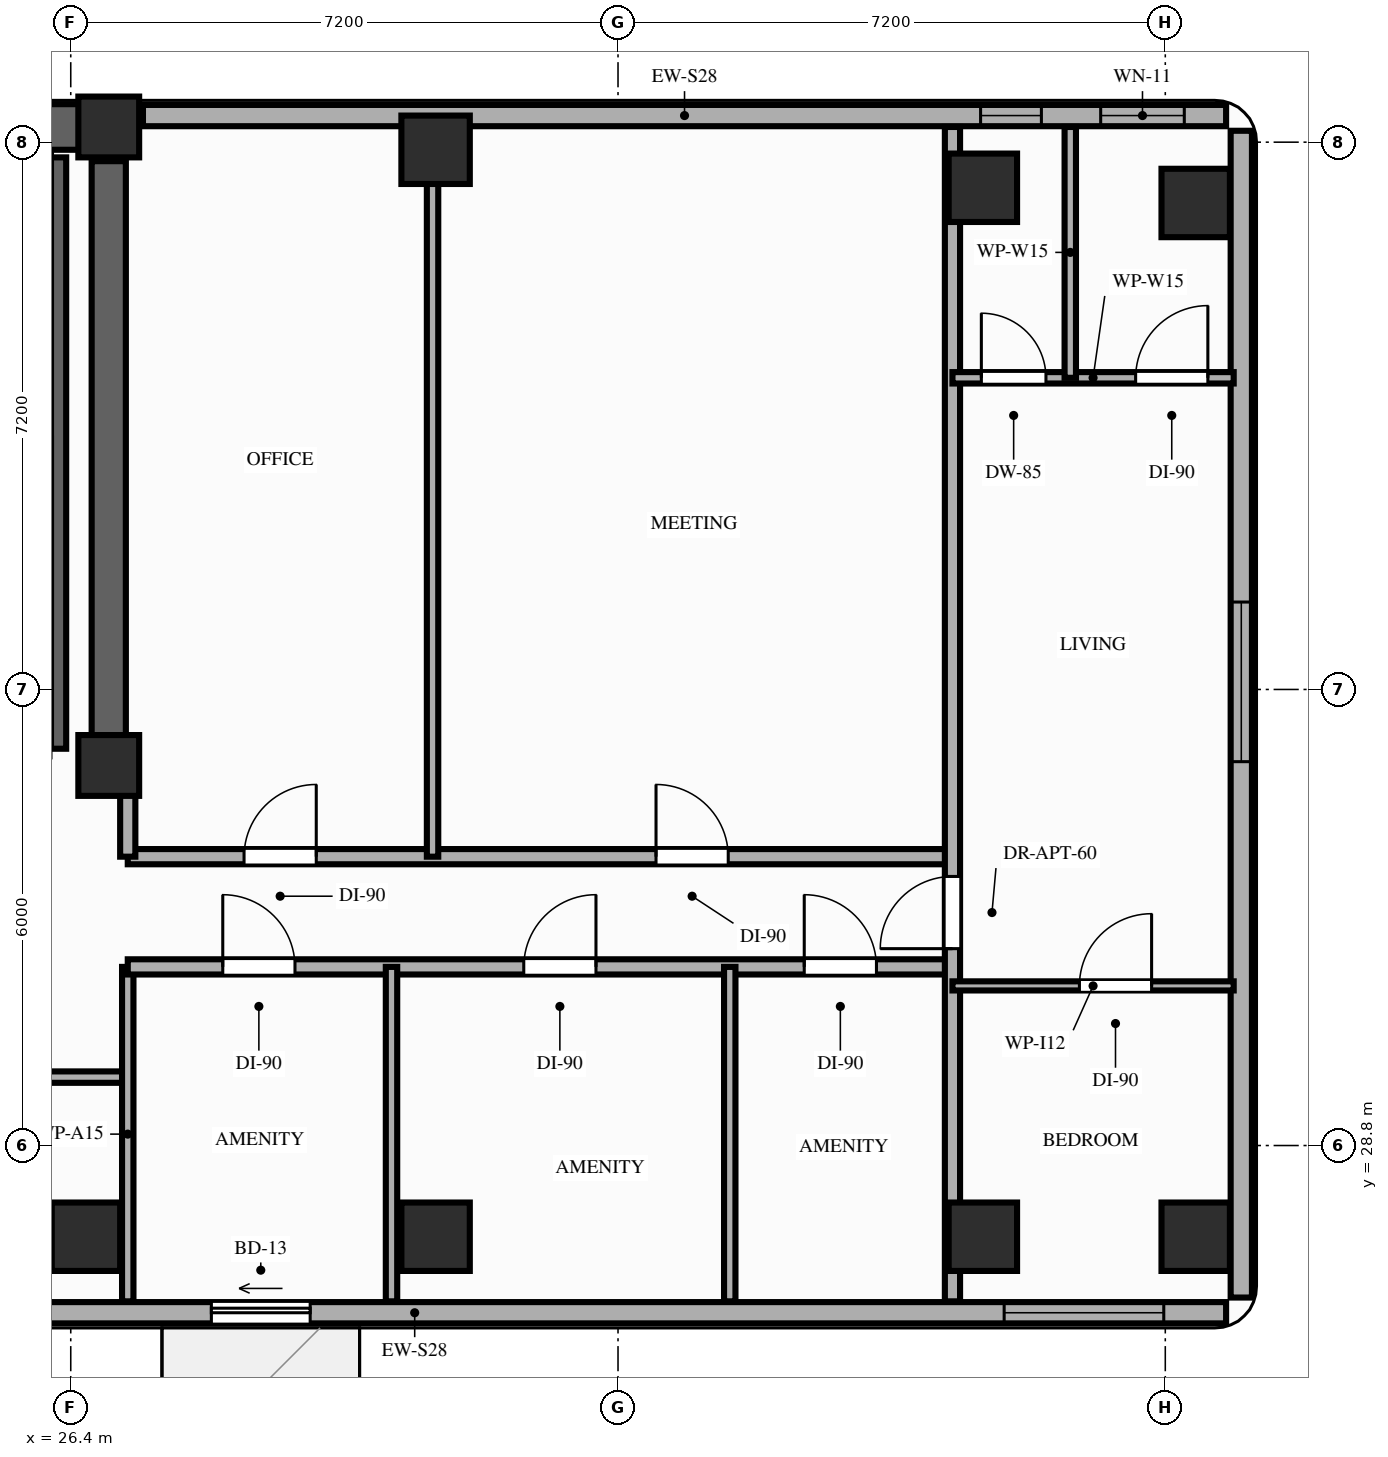
"""IFC4 building model, lengths in metres.
Left out: names, types, materials, properties, quantities, classifications, styles, units other than length and angle.
Written with IfcOpenShell. Run it as: python <this file> out.ifc"""

import sys

from ifc_helpers import new_model, si_unit, direction, frame, frame_2d, origin, origin_2d, place, context, subcontext, project, spatial, rectangle, extrude, element, fill, save


model = new_model("IFC4")
c1 = context("Model", 3, precision=1e-05, world=origin(), true_north=direction((0.0, 1.0)))
c2 = subcontext(c1, "Body", "Model", "MODEL_VIEW")
j1 = project(units=[si_unit("LENGTHUNIT", "METRE"), si_unit("PLANEANGLEUNIT", "RADIAN")], contexts=[c1])
p1 = place(None, origin())
s1 = spatial("IfcSite", under=j1, at=p1, CompositionType="ELEMENT")
p2 = place(p1, origin())
s2 = spatial("IfcBuilding", under=s1, at=p2, CompositionType="ELEMENT")
p3 = place(p2, frame((0.0, 0.0, 201.6)))
s3 = spatial("IfcBuildingStorey", under=s2, at=p3, CompositionType="ELEMENT", Elevation=201.6)
for number, where, z_axis, x_axis in (
    (1, (26.9, 33.8, 0.0), (0.0, 0.0, 1.0), (1.0, 0.0, 0.0)),
    (2, (26.9, 42.2, 0.0), (0.0, 0.0, 1.0), (1.0, 0.0, 0.0)),
):
    element("IfcColumn", number, at=place(p3, frame(where, z_axis=z_axis, x_axis=x_axis)), inside=s3, PredefinedType="COLUMN", context=c2, shape_type="SweptSolid", body=[
        extrude(rectangle(XDim=0.8, YDim=0.8, at=origin_2d()), origin(), (0.0, 0.0, 1.0), 3.2),
    ])
for number, where, z_axis, x_axis in (
    (3, (26.6, 27.6, 0.0), (0.0, 0.0, 1.0), (1.0, 0.0, 0.0)),
    (4, (31.2, 27.6, 0.0), (0.0, 0.0, 1.0), (1.0, 0.0, 0.0)),
    (5, (31.2, 41.9, 0.0), (0.0, 0.0, 1.0), (1.0, 0.0, 0.0)),
    (6, (38.4, 27.6, 0.0), (0.0, 0.0, 1.0), (1.0, 0.0, 0.0)),
    (7, (38.4, 41.4, 0.0), (0.0, 0.0, 1.0), (1.0, 0.0, 0.0)),
    (8, (41.2, 27.6, 0.0), (0.0, 0.0, 1.0), (1.0, 0.0, 0.0)),
    (9, (41.2, 41.2, 0.0), (0.0, 0.0, 1.0), (1.0, 0.0, 0.0)),
):
    element("IfcColumn", number, at=place(p3, frame(where, z_axis=z_axis, x_axis=x_axis)), inside=s3, PredefinedType="COLUMN", context=c2, shape_type="SweptSolid", body=[
        extrude(rectangle(XDim=0.9, YDim=0.9, at=origin_2d()), origin(), (0.0, 0.0, 1.0), 3.2),
    ])
p4 = place(p3, frame((41.6, 42.35, 0.0), z_axis=(0.0, 0.0, 1.0), x_axis=(-1.0, 0.0, 0.0)))
e10 = element("IfcWall", 10, at=p4, inside=s3, PredefinedType="STANDARD", context=c2, shape_type="SweptSolid", body=[
    extrude(rectangle(XDim=14.25, YDim=0.28, at=frame_2d((7.125, 0.0))), origin(), (0.0, 0.0, 1.0), 2.47),
])
p5 = place(p4, frame((2.43, 0.0, 0.85)))
e11 = element("IfcOpeningElement", 11, at=p5, cuts=e10, PredefinedType="OPENING", context=c2, shape_type="SweptSolid", body=[
    extrude(rectangle(XDim=0.8, YDim=1.37, at=frame_2d((0.4, 0.685))), frame((0.0, 0.15, 0.0), z_axis=(0.0, -1.0, 0.0), x_axis=(1.0, 0.0, 0.0)), (0.0, 0.0, 1.0), 0.3),
])
p6 = place(p4, frame((0.55, 0.0, 0.85)))
e12 = element("IfcOpeningElement", 12, at=p6, cuts=e10, PredefinedType="OPENING", context=c2, shape_type="SweptSolid", body=[
    extrude(rectangle(XDim=1.1, YDim=1.37, at=frame_2d((0.55, 0.685))), frame((0.0, 0.15, 0.0), z_axis=(0.0, -1.0, 0.0), x_axis=(1.0, 0.0, 0.0)), (0.0, 0.0, 1.0), 0.3),
])
p7 = place(p3, frame((20.25, 26.6, 0.0), z_axis=(0.0, 0.0, 1.0), x_axis=(1.0, 0.0, 0.0)))
e13 = element("IfcWall", 13, at=p7, inside=s3, PredefinedType="STANDARD", context=c2, shape_type="SweptSolid", body=[
    extrude(rectangle(XDim=21.35, YDim=0.28, at=frame_2d((10.675, 0.0))), origin(), (0.0, 0.0, 1.0), 3.02),
])
p8 = place(p7, frame((8.0, 0.0, 0.0)))
e14 = element("IfcOpeningElement", 14, at=p8, cuts=e13, PredefinedType="OPENING", context=c2, shape_type="SweptSolid", body=[
    extrude(rectangle(XDim=1.3, YDim=2.08, at=frame_2d((0.65, 1.04))), frame((0.0, 0.15, 0.0), z_axis=(0.0, -1.0, 0.0), x_axis=(1.0, 0.0, 0.0)), (0.0, 0.0, 1.0), 0.3),
])
p9 = place(p7, frame((18.43, 0.0, 0.85)))
e15 = element("IfcOpeningElement", 15, at=p9, cuts=e13, PredefinedType="OPENING", context=c2, shape_type="SweptSolid", body=[
    extrude(rectangle(XDim=2.1, YDim=1.8, at=frame_2d((1.05, 0.9))), frame((0.0, 0.15, 0.0), z_axis=(0.0, -1.0, 0.0), x_axis=(1.0, 0.0, 0.0)), (0.0, 0.0, 1.0), 0.3),
])
p10 = place(p7, frame((2.1, 0.0, 0.85)))
e16 = element("IfcOpeningElement", 16, at=p10, cuts=e13, PredefinedType="OPENING", context=c2, shape_type="SweptSolid", body=[
    extrude(rectangle(XDim=2.1, YDim=1.8, at=frame_2d((1.05, 0.9))), frame((0.0, 0.15, 0.0), z_axis=(0.0, -1.0, 0.0), x_axis=(1.0, 0.0, 0.0)), (0.0, 0.0, 1.0), 0.3),
])
p11 = place(p3, frame((41.8, 26.8, 0.0), z_axis=(0.0, 0.0, 1.0), x_axis=(0.0, 1.0, 0.0)))
e17 = element("IfcWall", 17, at=p11, inside=s3, PredefinedType="STANDARD", context=c2, shape_type="SweptSolid", body=[
    extrude(rectangle(XDim=15.35, YDim=0.28, at=frame_2d((7.675, 0.0))), origin(), (0.0, 0.0, 1.0), 3.02),
])
p12 = place(p11, frame((7.05, 0.0, 0.85)))
e18 = element("IfcOpeningElement", 18, at=p12, cuts=e17, PredefinedType="OPENING", context=c2, shape_type="SweptSolid", body=[
    extrude(rectangle(XDim=2.1, YDim=1.8, at=frame_2d((1.05, 0.9))), frame((0.0, 0.15, 0.0), z_axis=(0.0, -1.0, 0.0), x_axis=(1.0, 0.0, 0.0)), (0.0, 0.0, 1.0), 0.3),
])
p13 = place(p3, frame((6.45, 42.2, 0.0), z_axis=(0.0, 0.0, 1.0), x_axis=(1.0, 0.0, 0.0)))
e19 = element("IfcWall", 19, at=p13, inside=s3, PredefinedType="SHEAR", context=c2, shape_type="SweptSolid", body=[
    extrude(rectangle(XDim=20.45, YDim=0.6, at=frame_2d((10.225, 0.0))), origin(), (0.0, 0.0, 1.0), 3.02),
])
p14 = place(p3, frame((26.9, 33.8, 0.0), z_axis=(0.0, 0.0, 1.0), x_axis=(0.0, 1.0, 0.0)))
e20 = element("IfcWall", 20, at=p14, inside=s3, PredefinedType="SHEAR", context=c2, shape_type="SweptSolid", body=[
    extrude(rectangle(XDim=7.95, YDim=0.45, at=frame_2d((3.975, 0.0))), origin(), (0.0, 0.0, 1.0), 3.02),
])
p15 = place(p3, frame((26.24, 34.02, 0.0), z_axis=(0.0, 0.0, 1.0), x_axis=(0.0, 1.0, 0.0)))
e21 = element("IfcWall", 21, at=p15, inside=s3, PredefinedType="SHEAR", context=c2, shape_type="SweptSolid", body=[
    extrude(rectangle(XDim=7.78, YDim=0.2, at=frame_2d((3.89, 0.0))), origin(), (0.0, 0.0, 1.0), 3.02),
])
p16 = place(p3, frame((20.45, 29.7, 0.0), z_axis=(0.0, 0.0, 1.0), x_axis=(1.0, 0.0, 0.0)))
e22 = element("IfcWall", 22, at=p16, inside=s3, PredefinedType="PARTITIONING", context=c2, shape_type="SweptSolid", body=[
    extrude(rectangle(XDim=6.7, YDim=0.15, at=frame_2d((3.35, 0.0))), origin(), (0.0, 0.0, 1.0), 3.02),
])
p17 = place(p16, frame((2.8, 0.0, 0.0)))
e23 = element("IfcOpeningElement", 23, at=p17, cuts=e22, PredefinedType="OPENING", context=c2, shape_type="SweptSolid", body=[
    extrude(rectangle(XDim=0.95, YDim=2.15, at=frame_2d((0.475, 1.075))), frame((0.0, 0.085, 0.0), z_axis=(0.0, -1.0, 0.0), x_axis=(1.0, 0.0, 0.0)), (0.0, 0.0, 1.0), 0.17),
])
p18 = place(p3, frame((27.15, 26.75, 0.0), z_axis=(0.0, 0.0, 1.0), x_axis=(0.0, 1.0, 0.0)))
e24 = element("IfcWall", 24, at=p18, inside=s3, PredefinedType="PARTITIONING", context=c2, shape_type="SweptSolid", body=[
    extrude(rectangle(XDim=4.4, YDim=0.15, at=frame_2d((2.2, 0.0))), origin(), (0.0, 0.0, 1.0), 2.47),
])
p19 = place(p3, frame((27.15, 31.15, 0.0), z_axis=(0.0, 0.0, 1.0), x_axis=(1.0, 0.0, 0.0)))
e25 = element("IfcWall", 25, at=p19, inside=s3, PredefinedType="PARTITIONING", context=c2, shape_type="SweptSolid", body=[
    extrude(rectangle(XDim=10.85, YDim=0.2, at=frame_2d((5.425, 0.0))), origin(), (0.0, 0.0, 1.0), 2.47),
])
p20 = place(p19, frame((1.25, 0.0, 0.0)))
e26 = element("IfcOpeningElement", 26, at=p20, cuts=e25, PredefinedType="OPENING", context=c2, shape_type="SweptSolid", body=[
    extrude(rectangle(XDim=0.95, YDim=2.15, at=frame_2d((0.475, 1.075))), frame((0.0, 0.11, 0.0), z_axis=(0.0, -1.0, 0.0), x_axis=(1.0, 0.0, 0.0)), (0.0, 0.0, 1.0), 0.22),
])
p21 = place(p19, frame((5.21, 0.0, 0.0)))
e27 = element("IfcOpeningElement", 27, at=p21, cuts=e25, PredefinedType="OPENING", context=c2, shape_type="SweptSolid", body=[
    extrude(rectangle(XDim=0.95, YDim=2.15, at=frame_2d((0.475, 1.075))), frame((0.0, 0.11, 0.0), z_axis=(0.0, -1.0, 0.0), x_axis=(1.0, 0.0, 0.0)), (0.0, 0.0, 1.0), 0.22),
])
p22 = place(p19, frame((8.9, 0.0, 0.0)))
e28 = element("IfcOpeningElement", 28, at=p22, cuts=e25, PredefinedType="OPENING", context=c2, shape_type="SweptSolid", body=[
    extrude(rectangle(XDim=0.95, YDim=2.15, at=frame_2d((0.475, 1.075))), frame((0.0, 0.11, 0.0), z_axis=(0.0, -1.0, 0.0), x_axis=(1.0, 0.0, 0.0)), (0.0, 0.0, 1.0), 0.22),
])
p23 = place(p3, frame((27.15, 32.6, 0.0), z_axis=(0.0, 0.0, 1.0), x_axis=(1.0, 0.0, 0.0)))
e29 = element("IfcWall", 29, at=p23, inside=s3, PredefinedType="PARTITIONING", context=c2, shape_type="SweptSolid", body=[
    extrude(rectangle(XDim=10.85, YDim=0.2, at=frame_2d((5.425, 0.0))), origin(), (0.0, 0.0, 1.0), 2.47),
])
p24 = place(p23, frame((1.53, 0.0, 0.0)))
e30 = element("IfcOpeningElement", 30, at=p24, cuts=e29, PredefinedType="OPENING", context=c2, shape_type="SweptSolid", body=[
    extrude(rectangle(XDim=0.95, YDim=2.15, at=frame_2d((0.475, 1.075))), frame((0.0, 0.11, 0.0), z_axis=(0.0, -1.0, 0.0), x_axis=(1.0, 0.0, 0.0)), (0.0, 0.0, 1.0), 0.22),
])
p25 = place(p23, frame((6.95, 0.0, 0.0)))
e31 = element("IfcOpeningElement", 31, at=p25, cuts=e29, PredefinedType="OPENING", context=c2, shape_type="SweptSolid", body=[
    extrude(rectangle(XDim=0.95, YDim=2.15, at=frame_2d((0.475, 1.075))), frame((0.0, 0.11, 0.0), z_axis=(0.0, -1.0, 0.0), x_axis=(1.0, 0.0, 0.0)), (0.0, 0.0, 1.0), 0.22),
])
p26 = place(p3, frame((27.15, 32.6, 0.0), z_axis=(0.0, 0.0, 1.0), x_axis=(0.0, 1.0, 0.0)))
e32 = element("IfcWall", 32, at=p26, inside=s3, PredefinedType="PARTITIONING", context=c2, shape_type="SweptSolid", body=[
    extrude(rectangle(XDim=1.08, YDim=0.2, at=frame_2d((0.54, 0.0))), origin(), (0.0, 0.0, 1.0), 2.51),
])
p27 = place(p3, frame((38.0, 26.75, 0.0), z_axis=(0.0, 0.0, 1.0), x_axis=(0.0, 1.0, 0.0)))
e33 = element("IfcWall", 33, at=p27, inside=s3, PredefinedType="PARTITIONING", context=c2, shape_type="SweptSolid", body=[
    extrude(rectangle(XDim=15.45, YDim=0.2, at=frame_2d((7.725, 0.0))), origin(), (0.0, 0.0, 1.0), 2.47),
])
p28 = place(p27, frame((4.64, 0.0, 0.0)))
e34 = element("IfcOpeningElement", 34, at=p28, cuts=e33, PredefinedType="OPENING", context=c2, shape_type="SweptSolid", body=[
    extrude(rectangle(XDim=0.95, YDim=2.15, at=frame_2d((0.475, 1.075))), frame((0.0, 0.11, 0.0), z_axis=(0.0, -1.0, 0.0), x_axis=(1.0, 0.0, 0.0)), (0.0, 0.0, 1.0), 0.22),
])
p29 = place(p3, frame((38.0, 30.9, 0.0), z_axis=(0.0, 0.0, 1.0), x_axis=(1.0, 0.0, 0.0)))
e35 = element("IfcWall", 35, at=p29, inside=s3, PredefinedType="PARTITIONING", context=c2, shape_type="SweptSolid", body=[
    extrude(rectangle(XDim=3.7, YDim=0.12, at=frame_2d((1.85, 0.0))), origin(), (0.0, 0.0, 1.0), 2.47),
])
p30 = place(p29, frame((1.67, 0.0, 0.0)))
e36 = element("IfcOpeningElement", 36, at=p30, cuts=e35, PredefinedType="OPENING", context=c2, shape_type="SweptSolid", body=[
    extrude(rectangle(XDim=0.95, YDim=2.15, at=frame_2d((0.475, 1.075))), frame((0.0, 0.07, 0.0), z_axis=(0.0, -1.0, 0.0), x_axis=(1.0, 0.0, 0.0)), (0.0, 0.0, 1.0), 0.14),
])
p31 = place(p3, frame((38.0, 38.9, 0.0), z_axis=(0.0, 0.0, 1.0), x_axis=(1.0, 0.0, 0.0)))
e37 = element("IfcWall", 37, at=p31, inside=s3, PredefinedType="PARTITIONING", context=c2, shape_type="SweptSolid", body=[
    extrude(rectangle(XDim=3.7, YDim=0.15, at=frame_2d((1.85, 0.0))), origin(), (0.0, 0.0, 1.0), 2.47),
])
p32 = place(p31, frame((0.38, 0.0, 0.0)))
e38 = element("IfcOpeningElement", 38, at=p32, cuts=e37, PredefinedType="OPENING", context=c2, shape_type="SweptSolid", body=[
    extrude(rectangle(XDim=0.85, YDim=2.1, at=frame_2d((0.425, 1.05))), frame((0.0, 0.085, 0.0), z_axis=(0.0, -1.0, 0.0), x_axis=(1.0, 0.0, 0.0)), (0.0, 0.0, 1.0), 0.17),
])
p33 = place(p31, frame((2.41, 0.0, 0.0)))
e39 = element("IfcOpeningElement", 39, at=p33, cuts=e37, PredefinedType="OPENING", context=c2, shape_type="SweptSolid", body=[
    extrude(rectangle(XDim=0.95, YDim=2.15, at=frame_2d((0.475, 1.075))), frame((0.0, 0.085, 0.0), z_axis=(0.0, -1.0, 0.0), x_axis=(1.0, 0.0, 0.0)), (0.0, 0.0, 1.0), 0.17),
])
p34 = place(p3, frame((39.55, 38.9, 0.0), z_axis=(0.0, 0.0, 1.0), x_axis=(0.0, 1.0, 0.0)))
e40 = element("IfcWall", 40, at=p34, inside=s3, PredefinedType="PARTITIONING", context=c2, shape_type="SweptSolid", body=[
    extrude(rectangle(XDim=3.3, YDim=0.15, at=frame_2d((1.65, 0.0))), origin(), (0.0, 0.0, 1.0), 2.47),
])
for number, where, z_axis, x_axis in (
    (41, (30.62, 26.75, 0.0), (0.0, 0.0, 1.0), (0.0, 1.0, 0.0)),
    (42, (35.07, 26.75, 0.0), (0.0, 0.0, 1.0), (0.0, 1.0, 0.0)),
):
    element("IfcWall", number, at=place(p3, frame(where, z_axis=z_axis, x_axis=x_axis)), inside=s3, PredefinedType="PARTITIONING", context=c2, shape_type="SweptSolid", body=[
        extrude(rectangle(XDim=4.4, YDim=0.15, at=frame_2d((2.2, 0.0))), origin(), (0.0, 0.0, 1.0), 2.47),
    ])
p35 = place(p3, frame((31.16, 32.6, 0.0), z_axis=(0.0, 0.0, 1.0), x_axis=(0.0, 1.0, 0.0)))
e43 = element("IfcWall", 43, at=p35, inside=s3, PredefinedType="PARTITIONING", context=c2, shape_type="SweptSolid", body=[
    extrude(rectangle(XDim=9.6, YDim=0.15, at=frame_2d((4.8, 0.0))), origin(), (0.0, 0.0, 1.0), 2.47),
])
p36 = place(p8, origin())
e44 = element("IfcDoor", 44, at=p36, inside=s3, OperationType="SLIDING_TO_LEFT", PredefinedType="DOOR", context=c2, shape_type="SweptSolid", body=[
    extrude(rectangle(XDim=1.3, YDim=2.08, at=frame_2d((0.65, 1.04))), frame((0.0, 0.025, 0.0), z_axis=(0.0, -1.0, 0.0), x_axis=(1.0, 0.0, 0.0)), (0.0, 0.0, 1.0), 0.05),
])
fill(e14, e44)
p37 = place(p12, origin())
e45 = element("IfcWindow", 45, at=p37, inside=s3, PartitioningType="SINGLE_PANEL", PredefinedType="WINDOW", context=c2, shape_type="SweptSolid", body=[
    extrude(rectangle(XDim=2.1, YDim=1.8, at=frame_2d((1.05, 0.9))), frame((0.0, 0.03, 0.0), z_axis=(0.0, -1.0, 0.0), x_axis=(1.0, 0.0, 0.0)), (0.0, 0.0, 1.0), 0.06),
])
fill(e18, e45)
p38 = place(p9, origin())
e46 = element("IfcWindow", 46, at=p38, inside=s3, PartitioningType="SINGLE_PANEL", PredefinedType="WINDOW", context=c2, shape_type="SweptSolid", body=[
    extrude(rectangle(XDim=2.1, YDim=1.8, at=frame_2d((1.05, 0.9))), frame((0.0, 0.03, 0.0), z_axis=(0.0, -1.0, 0.0), x_axis=(1.0, 0.0, 0.0)), (0.0, 0.0, 1.0), 0.06),
])
fill(e15, e46)
p39 = place(p5, origin())
e47 = element("IfcWindow", 47, at=p39, inside=s3, PartitioningType="SINGLE_PANEL", PredefinedType="WINDOW", context=c2, shape_type="SweptSolid", body=[
    extrude(rectangle(XDim=0.8, YDim=1.37, at=frame_2d((0.4, 0.685))), frame((0.0, 0.03, 0.0), z_axis=(0.0, -1.0, 0.0), x_axis=(1.0, 0.0, 0.0)), (0.0, 0.0, 1.0), 0.06),
])
fill(e11, e47)
p40 = place(p6, origin())
e48 = element("IfcWindow", 48, at=p40, inside=s3, PartitioningType="SINGLE_PANEL", PredefinedType="WINDOW", context=c2, shape_type="SweptSolid", body=[
    extrude(rectangle(XDim=1.1, YDim=1.37, at=frame_2d((0.55, 0.685))), frame((0.0, 0.03, 0.0), z_axis=(0.0, -1.0, 0.0), x_axis=(1.0, 0.0, 0.0)), (0.0, 0.0, 1.0), 0.06),
])
fill(e12, e48)
p41 = place(p28, origin())
e49 = element("IfcDoor", 49, at=p41, inside=s3, OperationType="SINGLE_SWING_LEFT", PredefinedType="DOOR", context=c2, shape_type="SweptSolid", body=[
    extrude(rectangle(XDim=0.95, YDim=2.15, at=frame_2d((0.475, 1.075))), frame((0.0, 0.025, 0.0), z_axis=(0.0, -1.0, 0.0), x_axis=(1.0, 0.0, 0.0)), (0.0, 0.0, 1.0), 0.05),
])
fill(e34, e49)
p42 = place(p30, origin())
e50 = element("IfcDoor", 50, at=p42, inside=s3, OperationType="SINGLE_SWING_RIGHT", PredefinedType="DOOR", context=c2, shape_type="SweptSolid", body=[
    extrude(rectangle(XDim=0.95, YDim=2.15, at=frame_2d((0.475, 1.075))), frame((0.0, 0.025, 0.0), z_axis=(0.0, -1.0, 0.0), x_axis=(1.0, 0.0, 0.0)), (0.0, 0.0, 1.0), 0.05),
])
fill(e36, e50)
p43 = place(p32, origin())
e51 = element("IfcDoor", 51, at=p43, inside=s3, OperationType="SINGLE_SWING_LEFT", PredefinedType="DOOR", context=c2, shape_type="SweptSolid", body=[
    extrude(rectangle(XDim=0.85, YDim=2.1, at=frame_2d((0.425, 1.05))), frame((0.0, 0.025, 0.0), z_axis=(0.0, -1.0, 0.0), x_axis=(1.0, 0.0, 0.0)), (0.0, 0.0, 1.0), 0.05),
])
fill(e38, e51)
p44 = place(p33, origin())
e52 = element("IfcDoor", 52, at=p44, inside=s3, OperationType="SINGLE_SWING_RIGHT", PredefinedType="DOOR", context=c2, shape_type="SweptSolid", body=[
    extrude(rectangle(XDim=0.95, YDim=2.15, at=frame_2d((0.475, 1.075))), frame((0.0, 0.025, 0.0), z_axis=(0.0, -1.0, 0.0), x_axis=(1.0, 0.0, 0.0)), (0.0, 0.0, 1.0), 0.05),
])
fill(e39, e52)
p45 = place(p20, origin())
e53 = element("IfcDoor", 53, at=p45, inside=s3, OperationType="SINGLE_SWING_LEFT", PredefinedType="DOOR", context=c2, shape_type="SweptSolid", body=[
    extrude(rectangle(XDim=0.95, YDim=2.15, at=frame_2d((0.475, 1.075))), frame((0.0, 0.025, 0.0), z_axis=(0.0, -1.0, 0.0), x_axis=(1.0, 0.0, 0.0)), (0.0, 0.0, 1.0), 0.05),
])
fill(e26, e53)
p46 = place(p21, origin())
e54 = element("IfcDoor", 54, at=p46, inside=s3, OperationType="SINGLE_SWING_RIGHT", PredefinedType="DOOR", context=c2, shape_type="SweptSolid", body=[
    extrude(rectangle(XDim=0.95, YDim=2.15, at=frame_2d((0.475, 1.075))), frame((0.0, 0.025, 0.0), z_axis=(0.0, -1.0, 0.0), x_axis=(1.0, 0.0, 0.0)), (0.0, 0.0, 1.0), 0.05),
])
fill(e27, e54)
p47 = place(p22, origin())
e55 = element("IfcDoor", 55, at=p47, inside=s3, OperationType="SINGLE_SWING_LEFT", PredefinedType="DOOR", context=c2, shape_type="SweptSolid", body=[
    extrude(rectangle(XDim=0.95, YDim=2.15, at=frame_2d((0.475, 1.075))), frame((0.0, 0.025, 0.0), z_axis=(0.0, -1.0, 0.0), x_axis=(1.0, 0.0, 0.0)), (0.0, 0.0, 1.0), 0.05),
])
fill(e28, e55)
p48 = place(p24, origin())
e56 = element("IfcDoor", 56, at=p48, inside=s3, OperationType="SINGLE_SWING_RIGHT", PredefinedType="DOOR", context=c2, shape_type="SweptSolid", body=[
    extrude(rectangle(XDim=0.95, YDim=2.15, at=frame_2d((0.475, 1.075))), frame((0.0, 0.025, 0.0), z_axis=(0.0, -1.0, 0.0), x_axis=(1.0, 0.0, 0.0)), (0.0, 0.0, 1.0), 0.05),
])
fill(e30, e56)
p49 = place(p25, origin())
e57 = element("IfcDoor", 57, at=p49, inside=s3, OperationType="SINGLE_SWING_LEFT", PredefinedType="DOOR", context=c2, shape_type="SweptSolid", body=[
    extrude(rectangle(XDim=0.95, YDim=2.15, at=frame_2d((0.475, 1.075))), frame((0.0, 0.025, 0.0), z_axis=(0.0, -1.0, 0.0), x_axis=(1.0, 0.0, 0.0)), (0.0, 0.0, 1.0), 0.05),
])
fill(e31, e57)
save(model, sys.argv[1])
